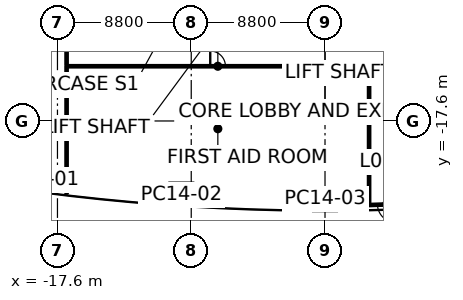
"""IFC4 building model, lengths in metres.
Left out: names, types, materials, properties, quantities, classifications, styles, units other than length and angle.
Written with IfcOpenShell. Run it as: python <this file> out.ifc"""

import sys

from ifc_helpers import new_model, si_unit, direction, frame, frame_2d, origin, origin_2d, place, context, subcontext, project, spatial, rectangle, extrude, element, fill, save


model = new_model("IFC4")
c1 = context("Model", 3, precision=1e-05, world=origin(), true_north=direction((0.0, 1.0)))
c2 = subcontext(c1, "Body", "Model", "MODEL_VIEW")
j1 = project(units=[si_unit("LENGTHUNIT", "METRE"), si_unit("PLANEANGLEUNIT", "RADIAN")], contexts=[c1])
p1 = place(None, origin())
s1 = spatial("IfcSite", under=j1, at=p1, CompositionType="ELEMENT")
p2 = place(p1, origin())
s2 = spatial("IfcBuilding", under=s1, at=p2, CompositionType="ELEMENT")
p3 = place(p2, origin())
s3 = spatial("IfcBuildingStorey", under=s2, at=p3, CompositionType="ELEMENT", Elevation=0.0)
for number, where, z_axis, x_axis in (
    (1, (-9.45, -22.439, 0.0), (0.0, 0.0, 1.0), (-0.998, 0.066, 0.0)),
    (2, (0.0, -22.75, 0.0), (0.0, 0.0, 1.0), (1.0, 0.0, 0.0)),
):
    element("IfcColumn", number, at=place(p3, frame(where, z_axis=z_axis, x_axis=x_axis)), inside=s3, PredefinedType="COLUMN", context=c2, shape_type="SweptSolid", body=[
        extrude(rectangle(XDim=1.4, YDim=1.4, at=origin_2d()), origin(), (0.0, 0.0, 1.0), 9.0),
    ])
p4 = place(p3, frame((-17.0, -14.0, 0.0), z_axis=(0.0, 0.0, 1.0), x_axis=(0.0, -1.0, 0.0)))
e3 = element("IfcWall", 3, at=p4, inside=s3, PredefinedType="PARTITIONING", context=c2, shape_type="SweptSolid", body=[
    extrude(rectangle(XDim=8.375, YDim=0.15, at=frame_2d((4.187, 0.0))), origin(), (0.0, 0.0, 1.0), 7.94),
])
p5 = place(p3, frame((-17.0, 13.92, 0.0), z_axis=(0.0, 0.0, 1.0), x_axis=(0.0, -1.0, 0.0)))
e4 = element("IfcWall", 4, at=p5, inside=s3, PredefinedType="PARTITIONING", context=c2, shape_type="SweptSolid", body=[
    extrude(rectangle(XDim=27.84, YDim=0.15, at=frame_2d((13.92, 0.0))), origin(), (0.0, 0.0, 1.0), 7.847),
])
p6 = place(p5, frame((9.32, 0.0, 0.0)))
e5 = element("IfcOpeningElement", 5, at=p6, cuts=e4, PredefinedType="OPENING", context=c2, shape_type="SweptSolid", body=[
    extrude(rectangle(XDim=1.0, YDim=2.1, at=frame_2d((0.5, 1.05))), frame((0.0, 0.075, 0.0), z_axis=(0.0, -1.0, 0.0), x_axis=(1.0, 0.0, 0.0)), (0.0, 0.0, 1.0), 0.15),
])
p7 = place(p5, frame((3.27, 0.0, 0.0)))
e6 = element("IfcOpeningElement", 6, at=p7, cuts=e4, PredefinedType="OPENING", context=c2, shape_type="SweptSolid", body=[
    extrude(rectangle(XDim=1.0, YDim=2.1, at=frame_2d((0.5, 1.05))), frame((0.0, 0.075, 0.0), z_axis=(0.0, -1.0, 0.0), x_axis=(1.0, 0.0, 0.0)), (0.0, 0.0, 1.0), 0.15),
])
p8 = place(p5, frame((19.43, 0.0, 0.0)))
e7 = element("IfcOpeningElement", 7, at=p8, cuts=e4, PredefinedType="OPENING", context=c2, shape_type="SweptSolid", body=[
    extrude(rectangle(XDim=1.0, YDim=2.1, at=frame_2d((0.5, 1.05))), frame((0.0, 0.075, 0.0), z_axis=(0.0, -1.0, 0.0), x_axis=(1.0, 0.0, 0.0)), (0.0, 0.0, 1.0), 0.15),
])
p9 = place(p3, frame((-16.92, -14.0, 0.0), z_axis=(0.0, 0.0, 1.0), x_axis=(1.0, 0.0, 0.0)))
e8 = element("IfcWall", 8, at=p9, inside=s3, PredefinedType="PARTITIONING", context=c2, shape_type="SweptSolid", body=[
    extrude(rectangle(XDim=19.82, YDim=0.15, at=frame_2d((9.91, 0.0))), origin(), (0.0, 0.0, 1.0), 7.94),
])
p10 = place(p9, frame((9.37, 0.0, 0.0)))
e9 = element("IfcOpeningElement", 9, at=p10, cuts=e8, PredefinedType="OPENING", context=c2, shape_type="SweptSolid", body=[
    extrude(rectangle(XDim=1.0, YDim=2.1, at=frame_2d((0.5, 1.05))), frame((0.0, 0.075, 0.0), z_axis=(0.0, -1.0, 0.0), x_axis=(1.0, 0.0, 0.0)), (0.0, 0.0, 1.0), 0.15),
])
p11 = place(p3, frame((2.9, -14.0, 0.0), z_axis=(0.0, 0.0, 1.0), x_axis=(0.0, -1.0, 0.0)))
e10 = element("IfcWall", 10, at=p11, inside=s3, PredefinedType="PARTITIONING", context=c2, shape_type="SweptSolid", body=[
    extrude(rectangle(XDim=9.131, YDim=0.15, at=frame_2d((4.565, 0.0))), origin(), (0.0, 0.0, 1.0), 7.94),
])
p12 = place(p3, frame((6.5, -23.011, 0.0), z_axis=(0.0, 0.0, 1.0), x_axis=(-0.999452852221, -0.033075613175, 0.0)))
e11 = element("IfcWall", 11, at=p12, inside=s3, PredefinedType="PARTITIONING", context=c2, shape_type="SweptSolid", body=[
    extrude(rectangle(XDim=3.602, YDim=0.15, at=frame_2d((1.801, 0.0))), origin(), (0.0, 0.0, 1.0), 7.94),
])
p13 = place(p12, frame((0.551, 0.0, 0.0)))
e12 = element("IfcOpeningElement", 12, at=p13, cuts=e11, PredefinedType="OPENING", context=c2, shape_type="SweptSolid", body=[
    extrude(rectangle(XDim=1.2, YDim=2.4, at=frame_2d((0.6, 1.2))), frame((0.0, 0.075, 0.0), z_axis=(0.0, -1.0, 0.0), x_axis=(1.0, 0.0, 0.0)), (0.0, 0.0, 1.0), 0.15),
])
p14 = place(p12, frame((1.851, 0.0, 0.0)))
e13 = element("IfcOpeningElement", 13, at=p14, cuts=e11, PredefinedType="OPENING", context=c2, shape_type="SweptSolid", body=[
    extrude(rectangle(XDim=1.2, YDim=2.4, at=frame_2d((0.6, 1.2))), frame((0.0, 0.075, 0.0), z_axis=(0.0, -1.0, 0.0), x_axis=(1.0, 0.0, 0.0)), (0.0, 0.0, 1.0), 0.15),
])
p15 = place(p10, origin())
e14 = element("IfcDoor", 14, at=p15, inside=s3, OperationType="SINGLE_SWING_RIGHT", PredefinedType="DOOR", context=c2, shape_type="SweptSolid", body=[
    extrude(rectangle(XDim=1.0, YDim=2.1, at=frame_2d((0.5, 1.05))), frame((0.0, 0.025, 0.0), z_axis=(0.0, -1.0, 0.0), x_axis=(1.0, 0.0, 0.0)), (0.0, 0.0, 1.0), 0.05),
])
fill(e9, e14)
p16 = place(p14, origin())
e15 = element("IfcDoor", 15, at=p16, inside=s3, OperationType="SINGLE_SWING_LEFT", PredefinedType="DOOR", context=c2, shape_type="SweptSolid", body=[
    extrude(rectangle(XDim=1.2, YDim=2.4, at=frame_2d((0.6, 1.2))), frame((0.0, 0.025, 0.0), z_axis=(0.0, -1.0, 0.0), x_axis=(1.0, 0.0, 0.0)), (0.0, 0.0, 1.0), 0.05),
])
fill(e13, e15)
save(model, sys.argv[1])
